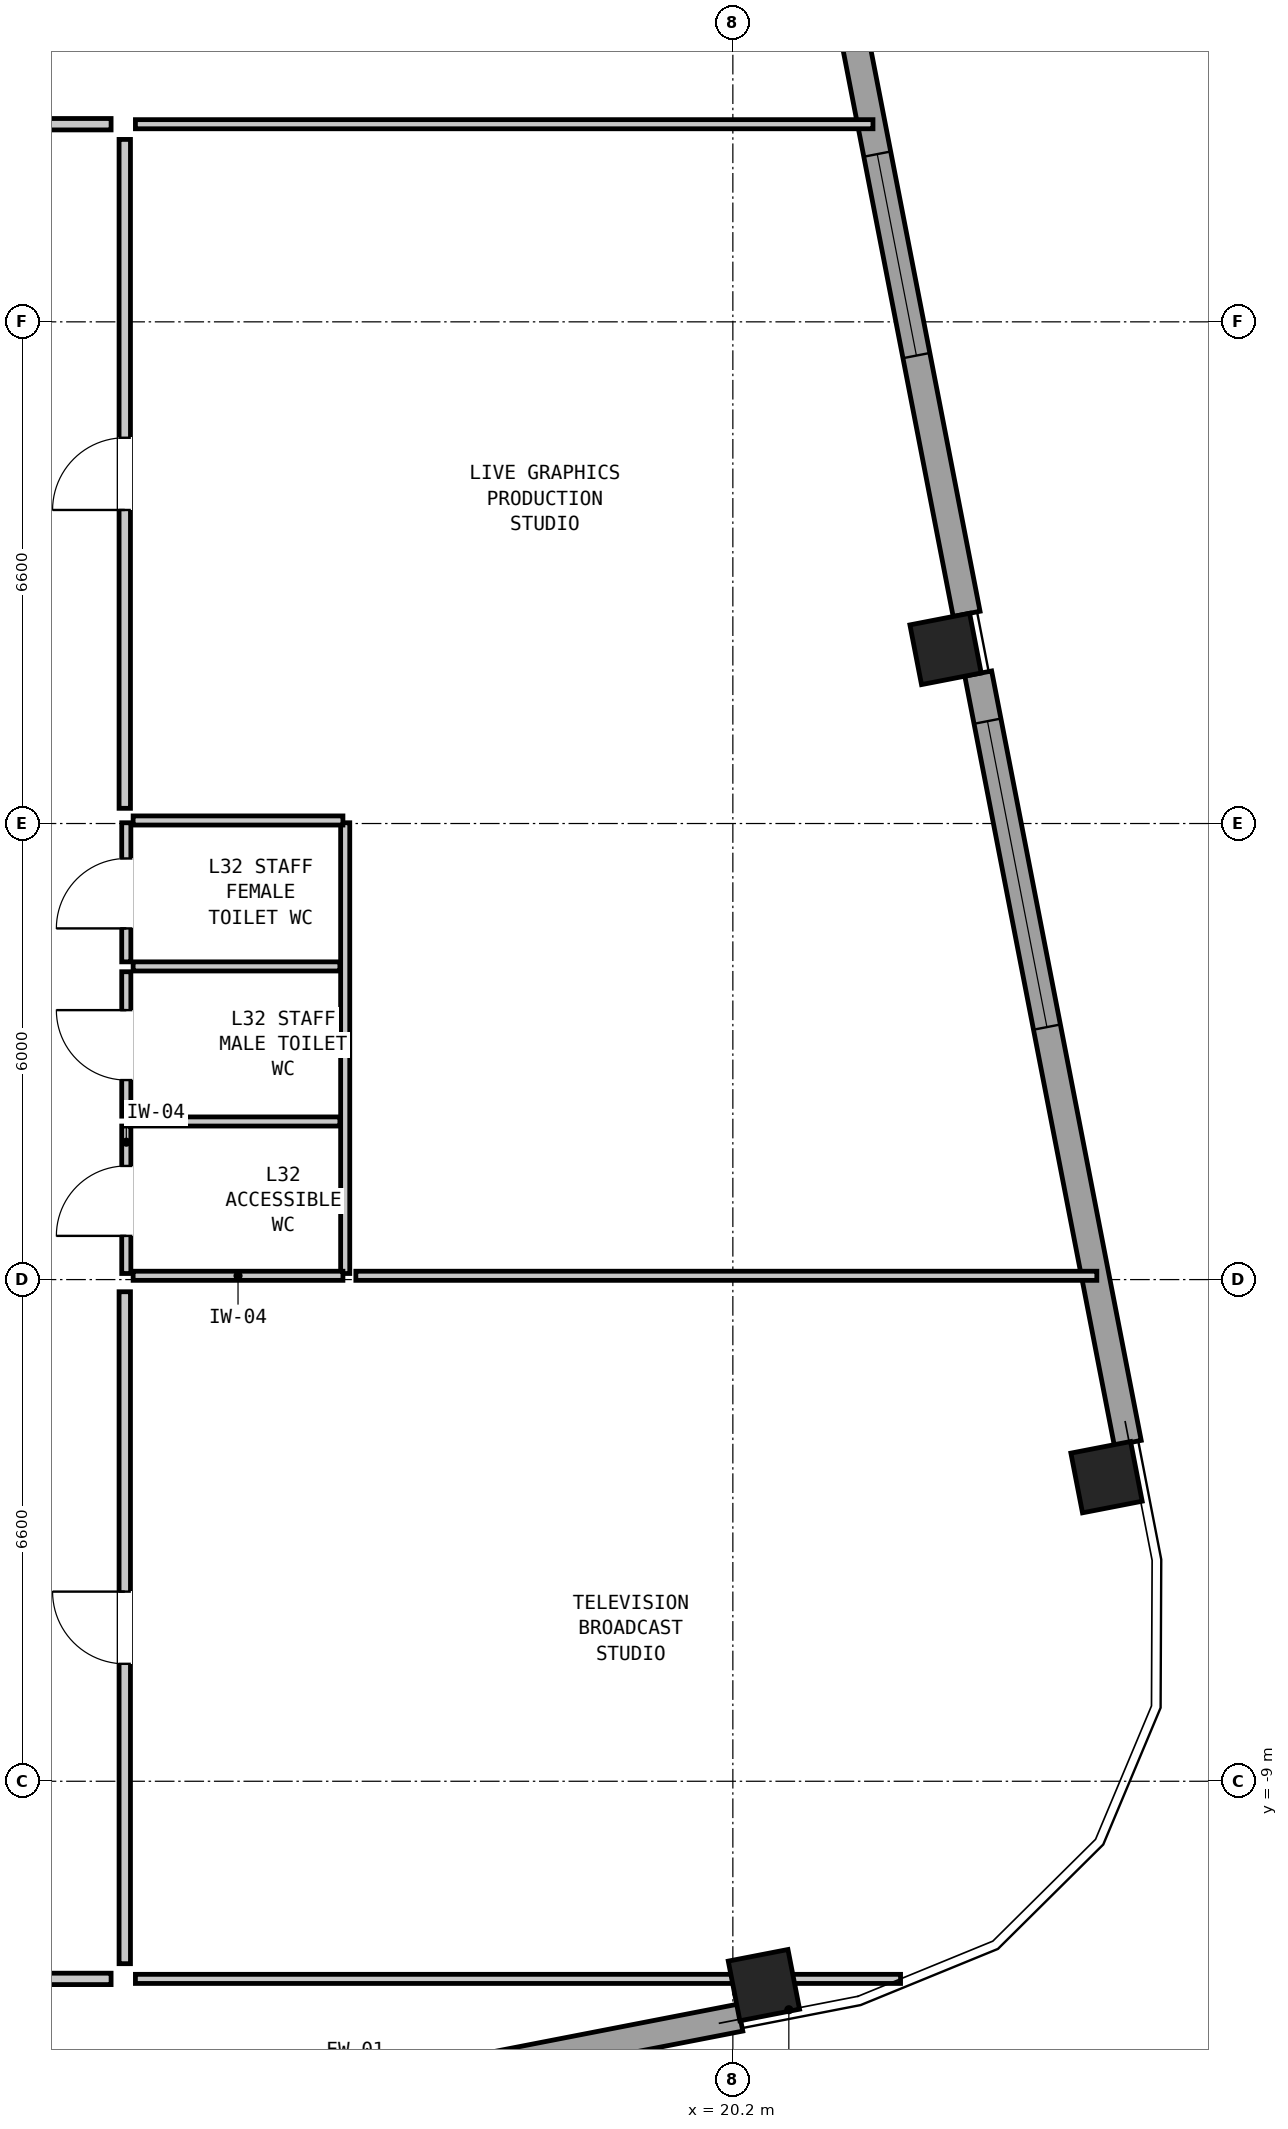
"""IFC4 building model, lengths in metres.
Left out: names, types, materials, properties, quantities, classifications, styles, units other than length and angle.
Written with IfcOpenShell. Run it as: python <this file> out.ifc"""

import sys

from ifc_helpers import new_model, si_unit, direction, frame, frame_2d, origin, origin_2d, place, context, subcontext, project, spatial, rectangle, hollow_rectangle, extrude, element, fill, save


model = new_model("IFC4")
c1 = context("Model", 3, precision=1e-05, world=origin(), true_north=direction((0.0, 1.0)))
c2 = subcontext(c1, "Body", "Model", "MODEL_VIEW")
j1 = project(units=[si_unit("LENGTHUNIT", "METRE"), si_unit("PLANEANGLEUNIT", "RADIAN")], contexts=[c1])
p1 = place(None, origin())
s1 = spatial("IfcSite", under=j1, at=p1, CompositionType="ELEMENT")
p2 = place(p1, origin())
s2 = spatial("IfcBuilding", under=s1, at=p2, CompositionType="ELEMENT")
p3 = place(p2, frame((0.0, 0.0, 112.8)))
s3 = spatial("IfcBuildingStorey", under=s2, at=p3, CompositionType="ELEMENT", Elevation=112.8)
for number, where, z_axis, x_axis in (
    (1, (20.609, -11.682, 0.0), (0.0, 0.0, 1.0), (0.982, 0.191, 0.0)),
    (2, (25.116, -5.0, 0.0), (0.0, 0.0, 1.0), (-0.191, 0.982, 0.0)),
    (3, (22.998, 5.896, 0.0), (0.0, 0.0, 1.0), (-0.191, 0.982, 0.0)),
):
    element("IfcColumn", number, at=place(p3, frame(where, z_axis=z_axis, x_axis=x_axis)), inside=s3, PredefinedType="COLUMN", context=c2, shape_type="SweptSolid", body=[
        extrude(hollow_rectangle(XDim=0.8, YDim=0.8, WallThickness=0.05, at=origin_2d()), origin(), (0.0, 0.0, 1.0), 3.05),
    ])
p4 = place(p3, frame((20.296, -12.11, 0.0), z_axis=(0.0, 0.0, 1.0), x_axis=(-0.981628941133, -0.190799952646, 0.0)))
e4 = element("IfcWall", 4, at=p4, inside=s3, PredefinedType="SOLIDWALL", context=c2, shape_type="SweptSolid", body=[
    extrude(rectangle(XDim=10.312, YDim=0.36, at=frame_2d((5.156, 0.0))), origin(), (0.0, 0.0, 1.0), 1.632),
])
p5 = place(p4, frame((5.8, 0.0, 0.2)))
e5 = element("IfcOpeningElement", 5, at=p5, cuts=e4, PredefinedType="OPENING", context=c2, shape_type="SweptSolid", body=[
    extrude(rectangle(XDim=3.7, YDim=1.1, at=frame_2d((1.85, 0.55))), frame((0.0, 0.192, 0.0), z_axis=(0.0, -1.0, 0.0), x_axis=(1.0, 0.0, 0.0)), (0.0, 0.0, 1.0), 0.384),
])
p6 = place(p3, frame((21.31, 16.469, 0.0), z_axis=(0.0, 0.0, 1.0), x_axis=(0.190811924826, -0.981626614016, 0.0)))
e6 = element("IfcWall", 6, at=p6, inside=s3, PredefinedType="SOLIDWALL", context=c2, shape_type="SweptSolid", body=[
    extrude(rectangle(XDim=10.3, YDim=0.36, at=frame_2d((5.15, 0.0))), origin(), (0.0, 0.0, 1.0), 1.632),
])
p7 = place(p6, frame((4.138, 0.0, 0.2)))
e7 = element("IfcOpeningElement", 7, at=p7, cuts=e6, PredefinedType="OPENING", context=c2, shape_type="SweptSolid", body=[
    extrude(rectangle(XDim=2.7, YDim=1.25, at=frame_2d((1.35, 0.625))), frame((0.0, 0.192, 0.0), z_axis=(0.0, -1.0, 0.0), x_axis=(1.0, 0.0, 0.0)), (0.0, 0.0, 1.0), 0.384),
])
p8 = place(p3, frame((23.428, 5.573, 0.0), z_axis=(0.0, 0.0, 1.0), x_axis=(0.190827200853, -0.981623644486, 0.0)))
e8 = element("IfcWall", 8, at=p8, inside=s3, PredefinedType="SOLIDWALL", context=c2, shape_type="SweptSolid", body=[
    extrude(rectangle(XDim=10.312, YDim=0.36, at=frame_2d((5.156, 0.0))), origin(), (0.0, 0.0, 1.0), 1.632),
])
p9 = place(p8, frame((0.638, 0.0, 0.2)))
e9 = element("IfcOpeningElement", 9, at=p9, cuts=e8, PredefinedType="OPENING", context=c2, shape_type="SweptSolid", body=[
    extrude(rectangle(XDim=4.1, YDim=1.05, at=frame_2d((2.05, 0.525))), frame((0.0, 0.192, 0.0), z_axis=(0.0, -1.0, 0.0), x_axis=(1.0, 0.0, 0.0)), (0.0, 0.0, 1.0), 0.384),
])
p10 = place(p3, frame((12.22, -2.32, 0.0), z_axis=(0.0, 0.0, 1.0), x_axis=(0.0, 1.0, 0.0)))
e10 = element("IfcWall", 10, at=p10, inside=s3, PredefinedType="PARTITIONING", context=c2, shape_type="SweptSolid", body=[
    extrude(rectangle(XDim=1.94, YDim=0.12, at=frame_2d((0.97, 0.0))), origin(), (0.0, 0.0, 1.0), 2.83),
])
p11 = place(p10, frame((0.495, 0.0, 0.0)))
e11 = element("IfcOpeningElement", 11, at=p11, cuts=e10, PredefinedType="OPENING", context=c2, shape_type="SweptSolid", body=[
    extrude(rectangle(XDim=0.92, YDim=2.1, at=frame_2d((0.46, 1.05))), frame((0.0, 0.072, 0.0), z_axis=(0.0, -1.0, 0.0), x_axis=(1.0, 0.0, 0.0)), (0.0, 0.0, 1.0), 0.144),
])
p12 = place(p3, frame((12.22, -0.25, 0.0), z_axis=(0.0, 0.0, 1.0), x_axis=(0.0, 1.0, 0.0)))
e12 = element("IfcWall", 12, at=p12, inside=s3, PredefinedType="PARTITIONING", context=c2, shape_type="SweptSolid", body=[
    extrude(rectangle(XDim=1.9, YDim=0.12, at=frame_2d((0.95, 0.0))), origin(), (0.0, 0.0, 1.0), 2.83),
])
p13 = place(p12, frame((0.475, 0.0, 0.0)))
e13 = element("IfcOpeningElement", 13, at=p13, cuts=e12, PredefinedType="OPENING", context=c2, shape_type="SweptSolid", body=[
    extrude(rectangle(XDim=0.92, YDim=2.1, at=frame_2d((0.46, 1.05))), frame((0.0, 0.072, 0.0), z_axis=(0.0, -1.0, 0.0), x_axis=(1.0, 0.0, 0.0)), (0.0, 0.0, 1.0), 0.144),
])
p14 = place(p3, frame((12.22, 1.78, 0.0), z_axis=(0.0, 0.0, 1.0), x_axis=(0.0, 1.0, 0.0)))
e14 = element("IfcWall", 14, at=p14, inside=s3, PredefinedType="PARTITIONING", context=c2, shape_type="SweptSolid", body=[
    extrude(rectangle(XDim=1.83, YDim=0.12, at=frame_2d((0.915, 0.0))), origin(), (0.0, 0.0, 1.0), 2.83),
])
p15 = place(p14, frame((0.44, 0.0, 0.0)))
e15 = element("IfcOpeningElement", 15, at=p15, cuts=e14, PredefinedType="OPENING", context=c2, shape_type="SweptSolid", body=[
    extrude(rectangle(XDim=0.92, YDim=2.1, at=frame_2d((0.46, 1.05))), frame((0.0, 0.072, 0.0), z_axis=(0.0, -1.0, 0.0), x_axis=(1.0, 0.0, 0.0)), (0.0, 0.0, 1.0), 0.144),
])
p16 = place(p3, frame((15.1, -2.32, 0.0), z_axis=(0.0, 0.0, 1.0), x_axis=(0.0, 1.0, 0.0)))
e16 = element("IfcWall", 16, at=p16, inside=s3, PredefinedType="PARTITIONING", context=c2, shape_type="SweptSolid", body=[
    extrude(rectangle(XDim=5.93, YDim=0.12, at=frame_2d((2.965, 0.0))), origin(), (0.0, 0.0, 1.0), 2.83),
])
for number, where, z_axis, x_axis in (
    (17, (12.31, -2.35, 0.0), (0.0, 0.0, 1.0), (1.0, 0.0, 0.0)),
    (18, (12.31, 3.64, 0.0), (0.0, 0.0, 1.0), (1.0, 0.0, 0.0)),
):
    element("IfcWall", number, at=place(p3, frame(where, z_axis=z_axis, x_axis=x_axis)), inside=s3, PredefinedType="PARTITIONING", context=c2, shape_type="SweptSolid", body=[
        extrude(rectangle(XDim=2.76, YDim=0.12, at=frame_2d((1.38, 0.0))), origin(), (0.0, 0.0, 1.0), 1.692),
    ])
for number, where, z_axis, x_axis in (
    (19, (12.31, -0.32, 0.0), (0.0, 0.0, 1.0), (1.0, 0.0, 0.0)),
    (20, (12.31, 1.72, 0.0), (0.0, 0.0, 1.0), (1.0, 0.0, 0.0)),
):
    element("IfcWall", number, at=place(p3, frame(where, z_axis=z_axis, x_axis=x_axis)), inside=s3, PredefinedType="PARTITIONING", context=c2, shape_type="SweptSolid", body=[
        extrude(rectangle(XDim=2.72, YDim=0.12, at=frame_2d((1.36, 0.0))), origin(), (0.0, 0.0, 1.0), 2.83),
    ])
p17 = place(p3, frame((12.34, 12.8, 0.0), z_axis=(0.0, 0.0, 1.0), x_axis=(1.0, 0.0, 0.0)))
e21 = element("IfcWall", 21, at=p17, inside=s3, PredefinedType="PARTITIONING", context=c2, shape_type="SweptSolid", body=[
    extrude(rectangle(XDim=9.703, YDim=0.12, at=frame_2d((4.852, 0.0))), origin(), (0.0, 0.0, 1.0), 2.83),
])
p18 = place(p3, frame((12.34, -11.6, 0.0), z_axis=(0.0, 0.0, 1.0), x_axis=(1.0, 0.0, 0.0)))
e22 = element("IfcWall", 22, at=p18, inside=s3, PredefinedType="PARTITIONING", context=c2, shape_type="SweptSolid", body=[
    extrude(rectangle(XDim=10.066, YDim=0.12, at=frame_2d((5.033, 0.0))), origin(), (0.0, 0.0, 1.0), 1.692),
])
p19 = place(p3, frame((15.24, -2.35, 0.0), z_axis=(0.0, 0.0, 1.0), x_axis=(1.0, 0.0, 0.0)))
e23 = element("IfcWall", 23, at=p19, inside=s3, PredefinedType="PARTITIONING", context=c2, shape_type="SweptSolid", body=[
    extrude(rectangle(XDim=9.748, YDim=0.12, at=frame_2d((4.874, 0.0))), origin(), (0.0, 0.0, 1.0), 1.692),
])
p20 = place(p3, frame((-2.12, 12.8, 0.0), z_axis=(0.0, 0.0, 1.0), x_axis=(1.0, 0.0, 0.0)))
e24 = element("IfcWall", 24, at=p20, inside=s3, PredefinedType="PARTITIONING", context=c2, shape_type="SweptSolid", body=[
    extrude(rectangle(XDim=14.14, YDim=0.15, at=frame_2d((7.07, 0.0))), origin(), (0.0, 0.0, 1.0), 2.83),
])
p21 = place(p20, frame((6.595, 0.0, 0.0)))
e25 = element("IfcOpeningElement", 25, at=p21, cuts=e24, PredefinedType="OPENING", context=c2, shape_type="SweptSolid", body=[
    extrude(rectangle(XDim=0.95, YDim=2.1, at=frame_2d((0.475, 1.05))), frame((0.0, 0.087, 0.0), z_axis=(0.0, -1.0, 0.0), x_axis=(1.0, 0.0, 0.0)), (0.0, 0.0, 1.0), 0.174),
])
p22 = place(p3, frame((-12.02, -11.6, 0.0), z_axis=(0.0, 0.0, 1.0), x_axis=(1.0, 0.0, 0.0)))
e26 = element("IfcWall", 26, at=p22, inside=s3, PredefinedType="PARTITIONING", context=c2, shape_type="SweptSolid", body=[
    extrude(rectangle(XDim=24.04, YDim=0.15, at=frame_2d((12.02, 0.0))), origin(), (0.0, 0.0, 1.0), 2.347),
])
p23 = place(p22, frame((11.545, 0.0, 0.0)))
e27 = element("IfcOpeningElement", 27, at=p23, cuts=e26, PredefinedType="OPENING", context=c2, shape_type="SweptSolid", body=[
    extrude(rectangle(XDim=0.95, YDim=2.1, at=frame_2d((0.475, 1.05))), frame((0.0, 0.087, 0.0), z_axis=(0.0, -1.0, 0.0), x_axis=(1.0, 0.0, 0.0)), (0.0, 0.0, 1.0), 0.174),
])
p24 = place(p3, frame((12.2, -11.4, 0.0), z_axis=(0.0, 0.0, 1.0), x_axis=(0.0, 1.0, 0.0)))
e28 = element("IfcWall", 28, at=p24, inside=s3, PredefinedType="PARTITIONING", context=c2, shape_type="SweptSolid", body=[
    extrude(rectangle(XDim=8.84, YDim=0.15, at=frame_2d((4.42, 0.0))), origin(), (0.0, 0.0, 1.0), 2.83),
])
p25 = place(p24, frame((3.945, 0.0, 0.0)))
e29 = element("IfcOpeningElement", 29, at=p25, cuts=e28, PredefinedType="OPENING", context=c2, shape_type="SweptSolid", body=[
    extrude(rectangle(XDim=0.95, YDim=2.1, at=frame_2d((0.475, 1.05))), frame((0.0, 0.087, 0.0), z_axis=(0.0, -1.0, 0.0), x_axis=(1.0, 0.0, 0.0)), (0.0, 0.0, 1.0), 0.174),
])
p26 = place(p3, frame((12.2, 3.8, 0.0), z_axis=(0.0, 0.0, 1.0), x_axis=(0.0, 1.0, 0.0)))
e30 = element("IfcWall", 30, at=p26, inside=s3, PredefinedType="PARTITIONING", context=c2, shape_type="SweptSolid", body=[
    extrude(rectangle(XDim=8.8, YDim=0.15, at=frame_2d((4.4, 0.0))), origin(), (0.0, 0.0, 1.0), 2.83),
])
p27 = place(p26, frame((3.925, 0.0, 0.0)))
e31 = element("IfcOpeningElement", 31, at=p27, cuts=e30, PredefinedType="OPENING", context=c2, shape_type="SweptSolid", body=[
    extrude(rectangle(XDim=0.95, YDim=2.1, at=frame_2d((0.475, 1.05))), frame((0.0, 0.087, 0.0), z_axis=(0.0, -1.0, 0.0), x_axis=(1.0, 0.0, 0.0)), (0.0, 0.0, 1.0), 0.174),
])
p28 = place(p7, origin())
e32 = element("IfcWindow", 32, at=p28, inside=s3, PartitioningType="SINGLE_PANEL", PredefinedType="WINDOW", context=c2, shape_type="SweptSolid", body=[
    extrude(rectangle(XDim=2.7, YDim=1.25, at=frame_2d((1.35, 0.625))), frame((0.0, 0.03, 0.0), z_axis=(0.0, -1.0, 0.0), x_axis=(1.0, 0.0, 0.0)), (0.0, 0.0, 1.0), 0.06),
])
fill(e7, e32)
p29 = place(p9, origin())
e33 = element("IfcWindow", 33, at=p29, inside=s3, PartitioningType="SINGLE_PANEL", PredefinedType="WINDOW", context=c2, shape_type="SweptSolid", body=[
    extrude(rectangle(XDim=4.1, YDim=1.05, at=frame_2d((2.05, 0.525))), frame((0.0, 0.03, 0.0), z_axis=(0.0, -1.0, 0.0), x_axis=(1.0, 0.0, 0.0)), (0.0, 0.0, 1.0), 0.06),
])
fill(e9, e33)
p30 = place(p11, origin())
e34 = element("IfcDoor", 34, at=p30, inside=s3, OperationType="SINGLE_SWING_LEFT", PredefinedType="DOOR", context=c2, shape_type="SweptSolid", body=[
    extrude(rectangle(XDim=0.92, YDim=2.1, at=frame_2d((0.46, 1.05))), frame((0.0, 0.025, 0.0), z_axis=(0.0, -1.0, 0.0), x_axis=(1.0, 0.0, 0.0)), (0.0, 0.0, 1.0), 0.05),
])
fill(e11, e34)
p31 = place(p13, origin())
e35 = element("IfcDoor", 35, at=p31, inside=s3, OperationType="SINGLE_SWING_RIGHT", PredefinedType="DOOR", context=c2, shape_type="SweptSolid", body=[
    extrude(rectangle(XDim=0.92, YDim=2.1, at=frame_2d((0.46, 1.05))), frame((0.0, 0.025, 0.0), z_axis=(0.0, -1.0, 0.0), x_axis=(1.0, 0.0, 0.0)), (0.0, 0.0, 1.0), 0.05),
])
fill(e13, e35)
p32 = place(p15, origin())
e36 = element("IfcDoor", 36, at=p32, inside=s3, OperationType="SINGLE_SWING_LEFT", PredefinedType="DOOR", context=c2, shape_type="SweptSolid", body=[
    extrude(rectangle(XDim=0.92, YDim=2.1, at=frame_2d((0.46, 1.05))), frame((0.0, 0.025, 0.0), z_axis=(0.0, -1.0, 0.0), x_axis=(1.0, 0.0, 0.0)), (0.0, 0.0, 1.0), 0.05),
])
fill(e15, e36)
p33 = place(p25, origin())
e37 = element("IfcDoor", 37, at=p33, inside=s3, OperationType="SINGLE_SWING_RIGHT", PredefinedType="DOOR", context=c2, shape_type="SweptSolid", body=[
    extrude(rectangle(XDim=0.95, YDim=2.1, at=frame_2d((0.475, 1.05))), frame((0.0, 0.025, 0.0), z_axis=(0.0, -1.0, 0.0), x_axis=(1.0, 0.0, 0.0)), (0.0, 0.0, 1.0), 0.05),
])
fill(e29, e37)
p34 = place(p27, origin())
e38 = element("IfcDoor", 38, at=p34, inside=s3, OperationType="SINGLE_SWING_LEFT", PredefinedType="DOOR", context=c2, shape_type="SweptSolid", body=[
    extrude(rectangle(XDim=0.95, YDim=2.1, at=frame_2d((0.475, 1.05))), frame((0.0, 0.025, 0.0), z_axis=(0.0, -1.0, 0.0), x_axis=(1.0, 0.0, 0.0)), (0.0, 0.0, 1.0), 0.05),
])
fill(e31, e38)
save(model, sys.argv[1])
